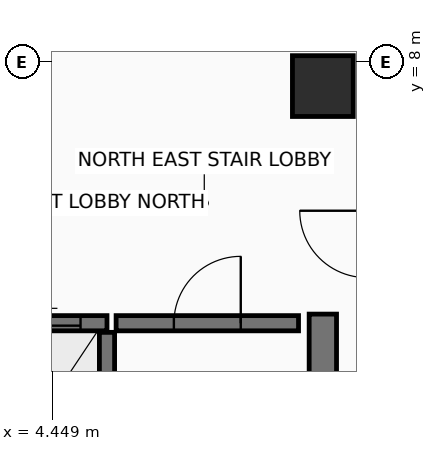
"""IFC4 building model, lengths in metres.
Left out: names, types, materials, properties, quantities, classifications, styles, units other than length and angle.
Written with IfcOpenShell. Run it as: python <this file> out.ifc"""

import sys

from ifc_helpers import new_model, si_unit, direction, frame, frame_2d, origin, origin_2d, place, context, subcontext, project, spatial, rectangle, extrude, element, fill, save


model = new_model("IFC4")
c1 = context("Model", 3, precision=1e-05, world=origin(), true_north=direction((0.0, 1.0)))
c2 = subcontext(c1, "Body", "Model", "MODEL_VIEW")
j1 = project(units=[si_unit("LENGTHUNIT", "METRE"), si_unit("PLANEANGLEUNIT", "RADIAN")], contexts=[c1])
p1 = place(None, origin())
s1 = spatial("IfcSite", under=j1, at=p1, CompositionType="ELEMENT")
p2 = place(p1, origin())
s2 = spatial("IfcBuilding", under=s1, at=p2, CompositionType="ELEMENT")
p3 = place(p2, frame((0.0, 0.0, 279.75)))
s3 = spatial("IfcBuildingStorey", under=s2, at=p3, CompositionType="ELEMENT", Elevation=279.75)
p4 = place(p3, frame((8.9, 7.6, 0.0), z_axis=(0.0, 0.0, 1.0), x_axis=(1.0, 0.0, 0.0)))
e1 = element("IfcColumn", 1, at=p4, inside=s3, PredefinedType="COLUMN", context=c2, shape_type="SweptSolid", body=[
    extrude(rectangle(XDim=1.0, YDim=1.0, at=origin_2d()), origin(), (0.0, 0.0, 1.0), 3.65),
])
p5 = place(p3, frame((8.9, -6.85, 0.0), z_axis=(0.0, 0.0, 1.0), x_axis=(0.0, 1.0, 0.0)))
e2 = element("IfcWall", 2, at=p5, inside=s3, PredefinedType="SHEAR", context=c2, shape_type="SweptSolid", body=[
    extrude(rectangle(XDim=10.7, YDim=0.45, at=frame_2d((5.35, 0.0))), origin(), (0.0, 0.0, 1.0), 3.465),
])
p6 = place(p3, frame((5.35, -3.75, 0.0), z_axis=(0.0, 0.0, 1.0), x_axis=(0.0, 1.0, 0.0)))
e3 = element("IfcWall", 3, at=p6, inside=s3, PredefinedType="SHEAR", context=c2, shape_type="SweptSolid", body=[
    extrude(rectangle(XDim=7.3, YDim=0.25, at=frame_2d((3.65, 0.0))), origin(), (0.0, 0.0, 1.0), 3.465),
])
p7 = place(p3, frame((5.5, 3.7, 0.0), z_axis=(0.0, 0.0, 1.0), x_axis=(1.0, 0.0, 0.0)))
e4 = element("IfcWall", 4, at=p7, inside=s3, PredefinedType="SHEAR", context=c2, shape_type="SweptSolid", body=[
    extrude(rectangle(XDim=3.0, YDim=0.25, at=frame_2d((1.5, 0.0))), origin(), (0.0, 0.0, 1.0), 3.465),
])
p8 = place(p7, frame((0.95, 0.0, 0.0)))
e5 = element("IfcOpeningElement", 5, at=p8, cuts=e4, PredefinedType="OPENING", context=c2, shape_type="SweptSolid", body=[
    extrude(rectangle(XDim=1.1, YDim=2.15, at=frame_2d((0.55, 1.075))), frame((0.0, 0.135, 0.0), z_axis=(0.0, -1.0, 0.0), x_axis=(1.0, 0.0, 0.0)), (0.0, 0.0, 1.0), 0.27),
])
p9 = place(p3, frame((3.28, 3.7, 0.0), z_axis=(0.0, 0.0, 1.0), x_axis=(1.0, 0.0, 0.0)))
e6 = element("IfcWall", 6, at=p9, inside=s3, PredefinedType="SHEAR", context=c2, shape_type="SweptSolid", body=[
    extrude(rectangle(XDim=2.07, YDim=0.25, at=frame_2d((1.035, 0.0))), origin(), (0.0, 0.0, 1.0), 3.465),
])
p10 = place(p9, frame((0.435, 0.0, 0.0)))
e7 = element("IfcOpeningElement", 7, at=p10, cuts=e6, PredefinedType="OPENING", context=c2, shape_type="SweptSolid", body=[
    extrude(rectangle(XDim=1.2, YDim=2.2, at=frame_2d((0.6, 1.1))), frame((0.0, 0.135, 0.0), z_axis=(0.0, -1.0, 0.0), x_axis=(1.0, 0.0, 0.0)), (0.0, 0.0, 1.0), 0.27),
])
p11 = place(p8, frame((1.1, 0.0, 0.0), z_axis=(0.0, 0.0, 1.0), x_axis=(-1.0, 0.0, 0.0)))
e8 = element("IfcDoor", 8, at=p11, inside=s3, OperationType="SINGLE_SWING_LEFT", PredefinedType="DOOR", context=c2, shape_type="SweptSolid", body=[
    extrude(rectangle(XDim=1.1, YDim=2.15, at=frame_2d((0.55, 1.075))), frame((0.0, 0.025, 0.0), z_axis=(0.0, -1.0, 0.0), x_axis=(1.0, 0.0, 0.0)), (0.0, 0.0, 1.0), 0.05),
])
fill(e5, e8)
p12 = place(p10, origin())
e9 = element("IfcDoor", 9, at=p12, inside=s3, OperationType="SLIDING_TO_RIGHT", PredefinedType="DOOR", context=c2, shape_type="SweptSolid", body=[
    extrude(rectangle(XDim=1.2, YDim=2.2, at=frame_2d((0.6, 1.1))), frame((0.0, 0.025, 0.0), z_axis=(0.0, -1.0, 0.0), x_axis=(1.0, 0.0, 0.0)), (0.0, 0.0, 1.0), 0.05),
])
fill(e7, e9)
save(model, sys.argv[1])
